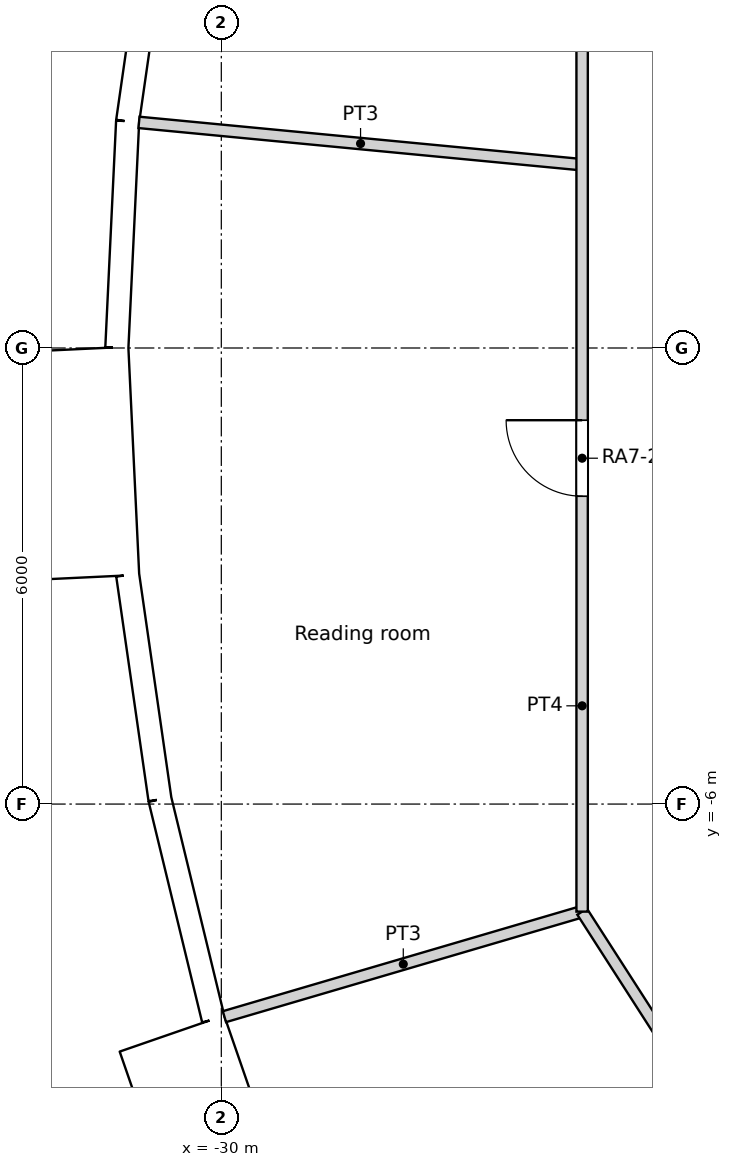
"""IFC4 building model, lengths in metres.
Left out: names, types, materials, properties, quantities, classifications, styles, units other than length and angle.
Written with IfcOpenShell. Run it as: python <this file> out.ifc"""

import sys

from ifc_helpers import new_model, si_unit, direction, frame, frame_2d, origin, origin_2d, place, context, subcontext, project, spatial, rectangle, circle, extrude, element, fill, save


model = new_model("IFC4")
c1 = context("Model", 3, precision=1e-05, world=origin(), true_north=direction((0.0, 1.0)))
c2 = subcontext(c1, "Body", "Model", "MODEL_VIEW")
j1 = project(units=[si_unit("LENGTHUNIT", "METRE"), si_unit("PLANEANGLEUNIT", "RADIAN")], contexts=[c1])
p1 = place(None, origin())
s1 = spatial("IfcSite", under=j1, at=p1, CompositionType="ELEMENT")
p2 = place(p1, origin())
s2 = spatial("IfcBuilding", under=s1, at=p2, CompositionType="ELEMENT")
p3 = place(p2, frame((0.0, 0.0, 93.0)))
s3 = spatial("IfcBuildingStorey", under=s2, at=p3, CompositionType="ELEMENT", Elevation=93.0)
for number, where, z_axis, x_axis in (
    (1, (-30.137, 2.878, 0.0), (0.0, 0.0, 1.0), (1.0, 0.0, 0.0)),
    (2, (-30.137, -2.878, 0.0), (0.0, 0.0, 1.0), (1.0, 0.0, 0.0)),
    (3, (-29.048, -8.529, 0.0), (0.0, 0.0, 1.0), (1.0, 0.0, 0.0)),
):
    element("IfcColumn", number, at=place(p3, frame(where, z_axis=z_axis, x_axis=x_axis)), inside=s3, PredefinedType="COLUMN", context=c2, shape_type="SweptSolid", body=[
        extrude(circle(Radius=0.6, at=origin_2d()), origin(), (0.0, 0.0, 1.0), 3.6),
    ])
for number, where, z_axis, x_axis in (
    (4, (-24.382, 2.85, 0.0), (0.0, 0.0, 1.0), (1.0, 0.0, 0.0)),
    (5, (-24.382, -2.85, 0.0), (0.0, 0.0, 1.0), (1.0, 0.0, 0.0)),
):
    element("IfcColumn", number, at=place(p3, frame(where, z_axis=z_axis, x_axis=x_axis)), inside=s3, PredefinedType="COLUMN", context=c2, shape_type="SweptSolid", body=[
        extrude(circle(Radius=0.65, at=origin_2d()), origin(), (0.0, 0.0, 1.0), 3.6),
    ])
p4 = place(p3, frame((-30.808, 5.932, 0.0), z_axis=(0.0, 0.0, 1.0), x_axis=(-0.142327539111, -0.989819615693, 0.0)))
e6 = element("IfcWall", 6, at=p4, inside=s3, PredefinedType="SOLIDWALL", context=c2, shape_type="SweptSolid", body=[
    extrude(rectangle(XDim=2.979, YDim=0.3, at=frame_2d((1.49, 0.0))), origin(), (0.0, 0.0, 1.0), 3.15),
])
p5 = place(p4, frame((1.49, 0.0, 1.55)))
e7 = element("IfcOpeningElement", 7, at=p5, cuts=e6, PredefinedType="OPENING", context=c2, shape_type="SweptSolid", body=[
    extrude(circle(Radius=0.9, at=origin_2d()), frame((0.0, 0.16, 0.0), z_axis=(0.0, -1.0, 0.0), x_axis=(1.0, 0.0, 0.0)), (0.0, 0.0, 1.0), 0.32),
])
p6 = place(p3, frame((-31.232, 2.982, 0.0), z_axis=(0.0, 0.0, 1.0), x_axis=(-0.047522328113, -0.998870175914, 0.0)))
e8 = element("IfcWall", 8, at=p6, inside=s3, PredefinedType="SOLIDWALL", context=c2, shape_type="SweptSolid", body=[
    extrude(rectangle(XDim=2.98, YDim=0.3, at=frame_2d((1.49, 0.0))), origin(), (0.0, 0.0, 1.0), 3.15),
])
p7 = place(p6, frame((1.49, 0.0, 1.55)))
e9 = element("IfcOpeningElement", 9, at=p7, cuts=e8, PredefinedType="OPENING", context=c2, shape_type="SweptSolid", body=[
    extrude(circle(Radius=0.9, at=origin_2d()), frame((0.0, 0.16, 0.0), z_axis=(0.0, -1.0, 0.0), x_axis=(1.0, 0.0, 0.0)), (0.0, 0.0, 1.0), 0.32),
])
p8 = place(p3, frame((-31.949, -0.02, -0.45), z_axis=(0.0, 0.0, 1.0), x_axis=(0.047607680889, -0.998866111509, 0.0)))
e10 = element("IfcWall", 10, at=p8, inside=s3, PredefinedType="ELEMENTEDWALL", context=c2, shape_type="SweptSolid", body=[
    extrude(rectangle(XDim=3.0, YDim=1.45, at=frame_2d((1.5, 0.0))), origin(), (0.0, 0.0, 1.0), 3.6),
])
p9 = place(p8, frame((1.5, 0.0, 2.0)))
e11 = element("IfcOpeningElement", 11, at=p9, cuts=e10, PredefinedType="OPENING", context=c2, shape_type="SweptSolid", body=[
    extrude(circle(Radius=0.9, at=origin_2d()), frame((0.0, 0.735, 0.0), z_axis=(0.0, -1.0, 0.0), x_axis=(1.0, 0.0, 0.0)), (0.0, 0.0, 1.0), 1.47),
])
p10 = place(p3, frame((-31.231, -2.988, 0.0), z_axis=(0.0, 0.0, 1.0), x_axis=(0.142315996627, -0.989821275334, 0.0)))
e12 = element("IfcWall", 12, at=p10, inside=s3, PredefinedType="SOLIDWALL", context=c2, shape_type="SweptSolid", body=[
    extrude(rectangle(XDim=2.98, YDim=0.3, at=frame_2d((1.49, 0.0))), origin(), (0.0, 0.0, 1.0), 3.15),
])
p11 = place(p10, frame((1.49, 0.0, 1.55)))
e13 = element("IfcOpeningElement", 13, at=p11, cuts=e12, PredefinedType="OPENING", context=c2, shape_type="SweptSolid", body=[
    extrude(circle(Radius=0.9, at=origin_2d()), frame((0.0, 0.16, 0.0), z_axis=(0.0, -1.0, 0.0), x_axis=(1.0, 0.0, 0.0)), (0.0, 0.0, 1.0), 0.32),
])
p12 = place(p3, frame((-30.807, -5.938, 0.0), z_axis=(0.0, 0.0, 1.0), x_axis=(0.235743081534, -0.971815414319, 0.0)))
e14 = element("IfcWall", 14, at=p12, inside=s3, PredefinedType="SOLIDWALL", context=c2, shape_type="SweptSolid", body=[
    extrude(rectangle(XDim=2.979, YDim=0.3, at=frame_2d((1.49, 0.0))), origin(), (0.0, 0.0, 1.0), 3.15),
])
p13 = place(p12, frame((1.49, 0.0, 1.55)))
e15 = element("IfcOpeningElement", 15, at=p13, cuts=e14, PredefinedType="OPENING", context=c2, shape_type="SweptSolid", body=[
    extrude(circle(Radius=0.9, at=origin_2d()), frame((0.0, 0.16, 0.0), z_axis=(0.0, -1.0, 0.0), x_axis=(1.0, 0.0, 0.0)), (0.0, 0.0, 1.0), 0.32),
])
p14 = place(p3, frame((-30.649, -9.021, -0.45), z_axis=(0.0, 0.0, 1.0), x_axis=(0.327071431777, -0.944999618262, 0.0)))
e16 = element("IfcWall", 16, at=p14, inside=s3, PredefinedType="ELEMENTEDWALL", context=c2, shape_type="SweptSolid", body=[
    extrude(rectangle(XDim=3.0, YDim=1.45, at=frame_2d((1.5, 0.0))), origin(), (0.0, 0.0, 1.0), 3.6),
])
p15 = place(p14, frame((1.5, 0.0, 2.0)))
e17 = element("IfcOpeningElement", 17, at=p15, cuts=e16, PredefinedType="OPENING", context=c2, shape_type="SweptSolid", body=[
    extrude(circle(Radius=0.9, at=origin_2d()), frame((0.0, 0.735, 0.0), z_axis=(0.0, -1.0, 0.0), x_axis=(1.0, 0.0, 0.0)), (0.0, 0.0, 1.0), 1.47),
])
p16 = place(p3, frame((-25.253, -7.415, 0.0), z_axis=(0.0, 0.0, 1.0), x_axis=(0.0, 1.0, 0.0)))
e18 = element("IfcWall", 18, at=p16, inside=s3, PredefinedType="PARTITIONING", context=c2, shape_type="SweptSolid", body=[
    extrude(rectangle(XDim=14.83, YDim=0.15, at=frame_2d((7.415, 0.0))), origin(), (0.0, 0.0, 1.0), 3.15),
])
p17 = place(p16, frame((11.826, 0.0, 0.0)))
e19 = element("IfcOpeningElement", 19, at=p17, cuts=e18, PredefinedType="OPENING", context=c2, shape_type="SweptSolid", body=[
    extrude(rectangle(XDim=1.0, YDim=2.04, at=frame_2d((0.5, 1.02))), frame((0.0, 0.075, 0.0), z_axis=(0.0, -1.0, 0.0), x_axis=(1.0, 0.0, 0.0)), (0.0, 0.0, 1.0), 0.15),
])
p18 = place(p16, frame((5.465, 0.0, 0.0)))
e20 = element("IfcOpeningElement", 20, at=p18, cuts=e18, PredefinedType="OPENING", context=c2, shape_type="SweptSolid", body=[
    extrude(rectangle(XDim=1.0, YDim=2.04, at=frame_2d((0.5, 1.02))), frame((0.0, 0.075, 0.0), z_axis=(0.0, -1.0, 0.0), x_axis=(1.0, 0.0, 0.0)), (0.0, 0.0, 1.0), 0.15),
])
p19 = place(p3, frame((-25.253, -7.415, 0.0), z_axis=(0.0, 0.0, 1.0), x_axis=(0.540656073354, -0.841243728265, 0.0)))
e21 = element("IfcWall", 21, at=p19, inside=s3, PredefinedType="PARTITIONING", context=c2, shape_type="SweptSolid", body=[
    extrude(rectangle(XDim=14.829, YDim=0.15, at=frame_2d((7.415, 0.0))), origin(), (0.0, 0.0, 1.0), 3.15),
])
p20 = place(p19, frame((4.804, 0.0, 0.0)))
e22 = element("IfcOpeningElement", 22, at=p20, cuts=e21, PredefinedType="OPENING", context=c2, shape_type="SweptSolid", body=[
    extrude(rectangle(XDim=1.8, YDim=2.1, at=frame_2d((0.9, 1.05))), frame((0.0, 0.075, 0.0), z_axis=(0.0, -1.0, 0.0), x_axis=(1.0, 0.0, 0.0)), (0.0, 0.0, 1.0), 0.15),
])
p21 = place(p3, frame((-31.083, 2.968, 0.0), z_axis=(0.0, 0.0, 1.0), x_axis=(0.995465070325, -0.095127775983, 0.0)))
e23 = element("IfcWall", 23, at=p21, inside=s3, PredefinedType="PARTITIONING", context=c2, shape_type="SweptSolid", body=[
    extrude(rectangle(XDim=5.857, YDim=0.15, at=frame_2d((2.928, 0.0))), origin(), (0.0, 0.0, 1.0), 3.15),
])
p22 = place(p3, frame((-29.959, -8.797, 0.0), z_axis=(0.0, 0.0, 1.0), x_axis=(0.959478767209, 0.281780934902, 0.0)))
e24 = element("IfcWall", 24, at=p22, inside=s3, PredefinedType="PARTITIONING", context=c2, shape_type="SweptSolid", body=[
    extrude(rectangle(XDim=4.905, YDim=0.15, at=frame_2d((2.452, 0.0))), origin(), (0.0, 0.0, 1.0), 3.15),
])
p23 = place(p5, origin())
e25 = element("IfcWindow", 25, at=p23, inside=s3, PartitioningType="SINGLE_PANEL", PredefinedType="WINDOW", context=c2, shape_type="SweptSolid", body=[
    extrude(circle(Radius=0.9, at=origin_2d()), frame((0.0, 0.12, 0.0), z_axis=(0.0, -1.0, 0.0), x_axis=(1.0, 0.0, 0.0)), (0.0, 0.0, 1.0), 0.1),
])
fill(e7, e25)
p24 = place(p7, origin())
e26 = element("IfcWindow", 26, at=p24, inside=s3, PartitioningType="SINGLE_PANEL", PredefinedType="WINDOW", context=c2, shape_type="SweptSolid", body=[
    extrude(circle(Radius=0.9, at=origin_2d()), frame((0.0, 0.12, 0.0), z_axis=(0.0, -1.0, 0.0), x_axis=(1.0, 0.0, 0.0)), (0.0, 0.0, 1.0), 0.1),
])
fill(e9, e26)
p25 = place(p9, origin())
e27 = element("IfcWindow", 27, at=p25, inside=s3, PartitioningType="SINGLE_PANEL", PredefinedType="WINDOW", context=c2, shape_type="SweptSolid", body=[
    extrude(circle(Radius=0.9, at=origin_2d()), frame((0.0, 0.695, 0.0), z_axis=(0.0, -1.0, 0.0), x_axis=(1.0, 0.0, 0.0)), (0.0, 0.0, 1.0), 0.1),
])
fill(e11, e27)
p26 = place(p11, origin())
e28 = element("IfcWindow", 28, at=p26, inside=s3, PartitioningType="SINGLE_PANEL", PredefinedType="WINDOW", context=c2, shape_type="SweptSolid", body=[
    extrude(circle(Radius=0.9, at=origin_2d()), frame((0.0, 0.12, 0.0), z_axis=(0.0, -1.0, 0.0), x_axis=(1.0, 0.0, 0.0)), (0.0, 0.0, 1.0), 0.1),
])
fill(e13, e28)
p27 = place(p13, origin())
e29 = element("IfcWindow", 29, at=p27, inside=s3, PartitioningType="SINGLE_PANEL", PredefinedType="WINDOW", context=c2, shape_type="SweptSolid", body=[
    extrude(circle(Radius=0.9, at=origin_2d()), frame((0.0, 0.12, 0.0), z_axis=(0.0, -1.0, 0.0), x_axis=(1.0, 0.0, 0.0)), (0.0, 0.0, 1.0), 0.1),
])
fill(e15, e29)
p28 = place(p15, origin())
e30 = element("IfcWindow", 30, at=p28, inside=s3, PartitioningType="SINGLE_PANEL", PredefinedType="WINDOW", context=c2, shape_type="SweptSolid", body=[
    extrude(circle(Radius=0.9, at=origin_2d()), frame((0.0, 0.695, 0.0), z_axis=(0.0, -1.0, 0.0), x_axis=(1.0, 0.0, 0.0)), (0.0, 0.0, 1.0), 0.1),
])
fill(e17, e30)
p29 = place(p18, origin())
e31 = element("IfcDoor", 31, at=p29, inside=s3, OperationType="SINGLE_SWING_RIGHT", PredefinedType="DOOR", context=c2, shape_type="SweptSolid", body=[
    extrude(rectangle(XDim=1.0, YDim=2.04, at=frame_2d((0.5, 1.02))), frame((0.0, 0.025, 0.0), z_axis=(0.0, -1.0, 0.0), x_axis=(1.0, 0.0, 0.0)), (0.0, 0.0, 1.0), 0.05),
])
fill(e20, e31)
save(model, sys.argv[1])
